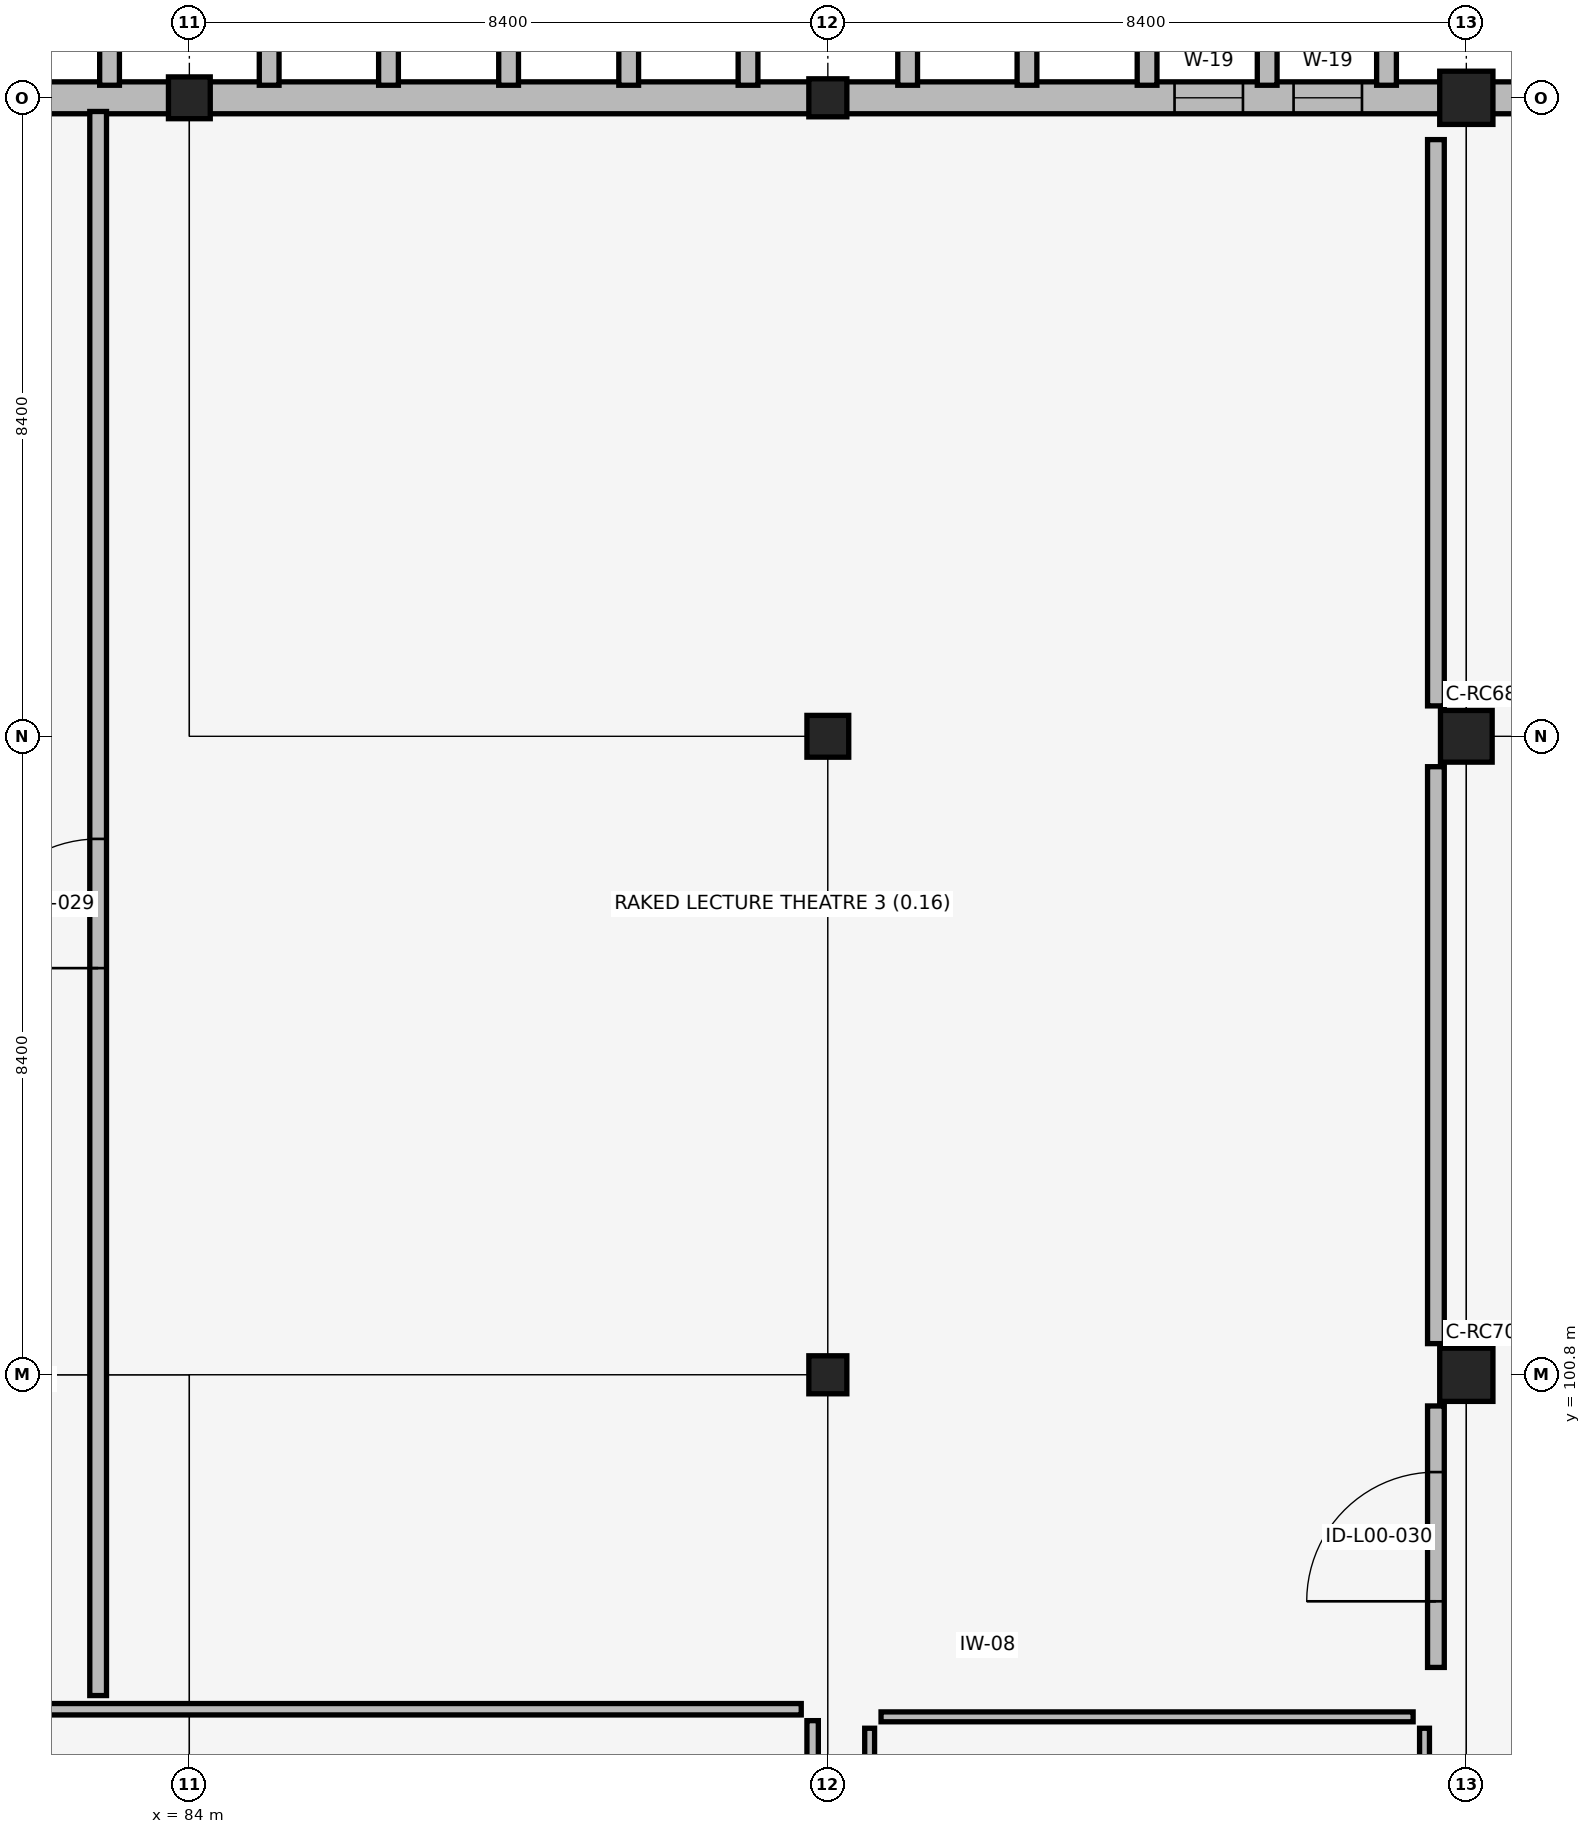
"""IFC4 building model, lengths in metres.
Left out: names, types, materials, properties, quantities, classifications, styles, units other than length and angle.
Written with IfcOpenShell. Run it as: python <this file> out.ifc"""

import sys

from ifc_helpers import new_model, si_unit, direction, frame, frame_2d, origin, origin_2d, place, context, subcontext, project, spatial, rectangle, extrude, element, fill, save


model = new_model("IFC4")
c1 = context("Model", 3, precision=1e-05, world=origin(), true_north=direction((0.0, 1.0)))
c2 = subcontext(c1, "Body", "Model", "MODEL_VIEW")
j1 = project(units=[si_unit("LENGTHUNIT", "METRE"), si_unit("PLANEANGLEUNIT", "RADIAN")], contexts=[c1])
p1 = place(None, origin())
s1 = spatial("IfcSite", under=j1, at=p1, CompositionType="ELEMENT")
p2 = place(p1, origin())
s2 = spatial("IfcBuilding", under=s1, at=p2, CompositionType="ELEMENT")
p3 = place(p2, origin())
s3 = spatial("IfcBuildingStorey", under=s2, at=p3, CompositionType="ELEMENT", Elevation=0.0)
p4 = place(p3, frame((84.0, 117.6, -0.32), z_axis=(0.0, 0.0, 1.0), x_axis=(1.0, 0.0, 0.0)))
e1 = element("IfcColumn", 1, at=p4, inside=s3, PredefinedType="COLUMN", context=c2, shape_type="SweptSolid", body=[
    extrude(rectangle(XDim=0.55, YDim=0.55, at=origin_2d()), origin(), (0.0, 0.0, 1.0), 5.46),
])
p5 = place(p3, frame((92.4, 100.8, -0.32), z_axis=(0.0, 0.0, 1.0), x_axis=(1.0, 0.0, 0.0)))
e2 = element("IfcColumn", 2, at=p5, inside=s3, PredefinedType="COLUMN", context=c2, shape_type="SweptSolid", body=[
    extrude(rectangle(XDim=0.5, YDim=0.5, at=origin_2d()), origin(), (0.0, 0.0, 1.0), 5.46),
])
p6 = place(p3, frame((92.4, 109.2, -0.32), z_axis=(0.0, 0.0, 1.0), x_axis=(1.0, 0.0, 0.0)))
e3 = element("IfcColumn", 3, at=p6, inside=s3, PredefinedType="COLUMN", context=c2, shape_type="SweptSolid", body=[
    extrude(rectangle(XDim=0.55, YDim=0.55, at=origin_2d()), origin(), (0.0, 0.0, 1.0), 5.46),
])
p7 = place(p3, frame((92.4, 117.6, -0.32), z_axis=(0.0, 0.0, 1.0), x_axis=(1.0, 0.0, 0.0)))
e4 = element("IfcColumn", 4, at=p7, inside=s3, PredefinedType="COLUMN", context=c2, shape_type="SweptSolid", body=[
    extrude(rectangle(XDim=0.5, YDim=0.5, at=origin_2d()), origin(), (0.0, 0.0, 1.0), 5.46),
])
p8 = place(p3, frame((100.8, 100.8, 0.0), z_axis=(0.0, 0.0, 1.0), x_axis=(1.0, 0.0, 0.0)))
e5 = element("IfcColumn", 5, at=p8, inside=s3, PredefinedType="COLUMN", context=c2, shape_type="SweptSolid", body=[
    extrude(rectangle(XDim=0.7, YDim=0.7, at=origin_2d()), origin(), (0.0, 0.0, 1.0), 5.14),
])
p9 = place(p3, frame((100.8, 109.2, 0.0), z_axis=(0.0, 0.0, 1.0), x_axis=(1.0, 0.0, 0.0)))
e6 = element("IfcColumn", 6, at=p9, inside=s3, PredefinedType="COLUMN", context=c2, shape_type="SweptSolid", body=[
    extrude(rectangle(XDim=0.68, YDim=0.68, at=origin_2d()), origin(), (0.0, 0.0, 1.0), 5.14),
])
p10 = place(p3, frame((100.8, 117.6, 0.0), z_axis=(0.0, 0.0, 1.0), x_axis=(1.0, 0.0, 0.0)))
e7 = element("IfcColumn", 7, at=p10, inside=s3, PredefinedType="COLUMN", context=c2, shape_type="SweptSolid", body=[
    extrude(rectangle(XDim=0.7, YDim=0.7, at=origin_2d()), origin(), (0.0, 0.0, 1.0), 5.14),
])
p11 = place(p3, frame((75.835, 117.6, 0.0), z_axis=(0.0, 0.0, 1.0), x_axis=(1.0, 0.0, 0.0)))
e8 = element("IfcWall", 8, at=p11, inside=s3, PredefinedType="SOLIDWALL", context=c2, shape_type="SweptSolid", body=[
    extrude(rectangle(XDim=7.905, YDim=0.42, at=frame_2d((3.953, 0.0))), origin(), (0.0, 0.0, 1.0), 4.4),
])
p12 = place(p11, frame((2.853, 0.0, 0.0)))
e9 = element("IfcOpeningElement", 9, at=p12, cuts=e8, PredefinedType="OPENING", context=c2, shape_type="SweptSolid", body=[
    extrude(rectangle(XDim=2.2, YDim=2.4, at=frame_2d((1.1, 1.2))), frame((0.0, 0.22, 0.0), z_axis=(0.0, -1.0, 0.0), x_axis=(1.0, 0.0, 0.0)), (0.0, 0.0, 1.0), 0.44),
])
p13 = place(p3, frame((82.95, 117.765, -0.32), z_axis=(0.0, 0.0, 1.0), x_axis=(0.0, 1.0, 0.0)))
e10 = element("IfcWall", 10, at=p13, inside=s3, PredefinedType="SOLIDWALL", context=c2, shape_type="SweptSolid", body=[
    extrude(rectangle(XDim=0.7, YDim=0.26, at=frame_2d((0.35, 0.0))), origin(), (0.0, 0.0, 1.0), 5.76),
])
p14 = place(p3, frame((84.26, 117.6, 0.0), z_axis=(0.0, 0.0, 1.0), x_axis=(1.0, 0.0, 0.0)))
e11 = element("IfcWall", 11, at=p14, inside=s3, PredefinedType="SOLIDWALL", context=c2, shape_type="SweptSolid", body=[
    extrude(rectangle(XDim=7.905, YDim=0.42, at=frame_2d((3.953, 0.0))), origin(), (0.0, 0.0, 1.0), 4.4),
])
for number, where, z_axis, x_axis in (
    (12, (85.05, 117.765, -0.32), (0.0, 0.0, 1.0), (0.0, 1.0, 0.0)),
    (13, (86.62, 117.765, -0.32), (0.0, 0.0, 1.0), (0.0, 1.0, 0.0)),
    (14, (88.2, 117.765, -0.32), (0.0, 0.0, 1.0), (0.0, 1.0, 0.0)),
    (15, (89.78, 117.765, -0.32), (0.0, 0.0, 1.0), (0.0, 1.0, 0.0)),
    (16, (91.35, 117.765, -0.32), (0.0, 0.0, 1.0), (0.0, 1.0, 0.0)),
):
    element("IfcWall", number, at=place(p3, frame(where, z_axis=z_axis, x_axis=x_axis)), inside=s3, PredefinedType="SOLIDWALL", context=c2, shape_type="SweptSolid", body=[
        extrude(rectangle(XDim=0.7, YDim=0.26, at=frame_2d((0.35, 0.0))), origin(), (0.0, 0.0, 1.0), 5.76),
    ])
p15 = place(p3, frame((92.635, 117.6, 0.0), z_axis=(0.0, 0.0, 1.0), x_axis=(1.0, 0.0, 0.0)))
e17 = element("IfcWall", 17, at=p15, inside=s3, PredefinedType="SOLIDWALL", context=c2, shape_type="SweptSolid", body=[
    extrude(rectangle(XDim=7.83, YDim=0.42, at=frame_2d((3.915, 0.0))), origin(), (0.0, 0.0, 1.0), 4.4),
])
p16 = place(p15, frame((4.326, 0.0, 0.75)))
e18 = element("IfcOpeningElement", 18, at=p16, cuts=e17, PredefinedType="OPENING", context=c2, shape_type="SweptSolid", body=[
    extrude(rectangle(XDim=0.9, YDim=3.0, at=frame_2d((0.45, 1.5))), frame((0.0, 0.22, 0.0), z_axis=(0.0, -1.0, 0.0), x_axis=(1.0, 0.0, 0.0)), (0.0, 0.0, 1.0), 0.44),
])
p17 = place(p15, frame((5.892, 0.0, 0.75)))
e19 = element("IfcOpeningElement", 19, at=p17, cuts=e17, PredefinedType="OPENING", context=c2, shape_type="SweptSolid", body=[
    extrude(rectangle(XDim=0.9, YDim=3.0, at=frame_2d((0.45, 1.5))), frame((0.0, 0.22, 0.0), z_axis=(0.0, -1.0, 0.0), x_axis=(1.0, 0.0, 0.0)), (0.0, 0.0, 1.0), 0.44),
])
for number, where, z_axis, x_axis in (
    (20, (93.45, 117.765, -0.32), (0.0, 0.0, 1.0), (0.0, 1.0, 0.0)),
    (21, (95.02, 117.765, -0.32), (0.0, 0.0, 1.0), (0.0, 1.0, 0.0)),
    (22, (96.6, 117.765, -0.32), (0.0, 0.0, 1.0), (0.0, 1.0, 0.0)),
    (23, (98.18, 117.765, -0.32), (0.0, 0.0, 1.0), (0.0, 1.0, 0.0)),
):
    element("IfcWall", number, at=place(p3, frame(where, z_axis=z_axis, x_axis=x_axis)), inside=s3, PredefinedType="SOLIDWALL", context=c2, shape_type="SweptSolid", body=[
        extrude(rectangle(XDim=0.7, YDim=0.26, at=frame_2d((0.35, 0.0))), origin(), (0.0, 0.0, 1.0), 5.76),
    ])
p18 = place(p3, frame((99.75, 117.765, -0.25), z_axis=(0.0, 0.0, 1.0), x_axis=(0.0, 1.0, 0.0)))
e24 = element("IfcWall", 24, at=p18, inside=s3, PredefinedType="SOLIDWALL", context=c2, shape_type="SweptSolid", body=[
    extrude(rectangle(XDim=0.7, YDim=0.26, at=frame_2d((0.35, 0.0))), origin(), (0.0, 0.0, 1.0), 5.69),
])
p19 = place(p3, frame((101.135, 117.6, 0.0), z_axis=(0.0, 0.0, 1.0), x_axis=(1.0, 0.0, 0.0)))
e25 = element("IfcWall", 25, at=p19, inside=s3, PredefinedType="SOLIDWALL", context=c2, shape_type="SweptSolid", body=[
    extrude(rectangle(XDim=7.74, YDim=0.42, at=frame_2d((3.87, 0.0))), origin(), (0.0, 0.0, 1.0), 4.4),
])
p20 = place(p3, frame((71.38, 96.4, 0.0), z_axis=(0.0, 0.0, 1.0), x_axis=(1.0, 0.0, 0.0)))
e26 = element("IfcWall", 26, at=p20, inside=s3, PredefinedType="PARTITIONING", context=c2, shape_type="SweptSolid", body=[
    extrude(rectangle(XDim=20.67, YDim=0.15, at=frame_2d((10.335, 0.0))), origin(), (0.0, 0.0, 1.0), 4.74),
])
p21 = place(p3, frame((92.2, 92.735, 0.0), z_axis=(0.0, 0.0, 1.0), x_axis=(0.0, 1.0, 0.0)))
e27 = element("IfcWall", 27, at=p21, inside=s3, PredefinedType="PARTITIONING", context=c2, shape_type="SweptSolid", body=[
    extrude(rectangle(XDim=3.515, YDim=0.15, at=frame_2d((1.757, 0.0))), origin(), (0.0, 0.0, 1.0), 5.14),
])
p22 = place(p3, frame((93.1, 96.3, 0.0), z_axis=(0.0, 0.0, 1.0), x_axis=(1.0, 0.0, 0.0)))
e28 = element("IfcWall", 28, at=p22, inside=s3, PredefinedType="PARTITIONING", context=c2, shape_type="SweptSolid", body=[
    extrude(rectangle(XDim=7.0, YDim=0.13, at=frame_2d((3.5, 0.0))), origin(), (0.0, 0.0, 1.0), 5.14),
])
for number, where, z_axis, x_axis in (
    (29, (92.95, 87.5, 0.0), (0.0, 0.0, 1.0), (0.0, 1.0, 0.0)),
    (30, (100.25, 87.5, 0.0), (0.0, 0.0, 1.0), (0.0, 1.0, 0.0)),
):
    element("IfcWall", number, at=place(p3, frame(where, z_axis=z_axis, x_axis=x_axis)), inside=s3, PredefinedType="PARTITIONING", context=c2, shape_type="SweptSolid", body=[
        extrude(rectangle(XDim=8.65, YDim=0.13, at=frame_2d((4.325, 0.0))), origin(), (0.0, 0.0, 1.0), 4.46),
    ])
p23 = place(p3, frame((82.8, 96.58, 0.0), z_axis=(0.0, 0.0, 1.0), x_axis=(0.0, 1.0, 0.0)))
e31 = element("IfcWall", 31, at=p23, inside=s3, PredefinedType="PARTITIONING", context=c2, shape_type="SweptSolid", body=[
    extrude(rectangle(XDim=20.84, YDim=0.22, at=frame_2d((10.42, 0.0))), origin(), (0.0, 0.0, 1.0), 3.74),
])
p24 = place(p23, frame((9.57, 0.0, 0.0)))
e32 = element("IfcOpeningElement", 32, at=p24, cuts=e31, PredefinedType="OPENING", context=c2, shape_type="SweptSolid", body=[
    extrude(rectangle(XDim=1.7, YDim=2.25, at=frame_2d((0.85, 1.125))), frame((0.0, 0.12, 0.0), z_axis=(0.0, -1.0, 0.0), x_axis=(1.0, 0.0, 0.0)), (0.0, 0.0, 1.0), 0.24),
])
p25 = place(p3, frame((100.4, 96.95, 0.0), z_axis=(0.0, 0.0, 1.0), x_axis=(0.0, 1.0, 0.0)))
e33 = element("IfcWall", 33, at=p25, inside=s3, PredefinedType="PARTITIONING", context=c2, shape_type="SweptSolid", body=[
    extrude(rectangle(XDim=3.44, YDim=0.22, at=frame_2d((1.72, 0.0))), origin(), (0.0, 0.0, 1.0), 5.14),
])
p26 = place(p25, frame((0.87, 0.0, 0.0)))
e34 = element("IfcOpeningElement", 34, at=p26, cuts=e33, PredefinedType="OPENING", context=c2, shape_type="SweptSolid", body=[
    extrude(rectangle(XDim=1.7, YDim=2.25, at=frame_2d((0.85, 1.125))), frame((0.0, 0.12, 0.0), z_axis=(0.0, -1.0, 0.0), x_axis=(1.0, 0.0, 0.0)), (0.0, 0.0, 1.0), 0.24),
])
p27 = place(p3, frame((100.4, 101.21, 0.0), z_axis=(0.0, 0.0, 1.0), x_axis=(0.0, 1.0, 0.0)))
e35 = element("IfcWall", 35, at=p27, inside=s3, PredefinedType="PARTITIONING", context=c2, shape_type="SweptSolid", body=[
    extrude(rectangle(XDim=7.59, YDim=0.22, at=frame_2d((3.795, 0.0))), origin(), (0.0, 0.0, 1.0), 5.14),
])
p28 = place(p3, frame((100.4, 109.6, 0.0), z_axis=(0.0, 0.0, 1.0), x_axis=(0.0, 1.0, 0.0)))
e36 = element("IfcWall", 36, at=p28, inside=s3, PredefinedType="PARTITIONING", context=c2, shape_type="SweptSolid", body=[
    extrude(rectangle(XDim=7.45, YDim=0.22, at=frame_2d((3.725, 0.0))), origin(), (0.0, 0.0, 1.0), 4.59),
])
p29 = place(p16, origin())
e37 = element("IfcWindow", 37, at=p29, inside=s3, PartitioningType="DOUBLE_PANEL_VERTICAL", PredefinedType="WINDOW", context=c2, shape_type="SweptSolid", body=[
    extrude(rectangle(XDim=0.9, YDim=3.0, at=frame_2d((0.45, 1.5))), frame((0.0, 0.03, 0.0), z_axis=(0.0, -1.0, 0.0), x_axis=(1.0, 0.0, 0.0)), (0.0, 0.0, 1.0), 0.06),
])
fill(e18, e37)
p30 = place(p17, origin())
e38 = element("IfcWindow", 38, at=p30, inside=s3, PartitioningType="DOUBLE_PANEL_VERTICAL", PredefinedType="WINDOW", context=c2, shape_type="SweptSolid", body=[
    extrude(rectangle(XDim=0.9, YDim=3.0, at=frame_2d((0.45, 1.5))), frame((0.0, 0.03, 0.0), z_axis=(0.0, -1.0, 0.0), x_axis=(1.0, 0.0, 0.0)), (0.0, 0.0, 1.0), 0.06),
])
fill(e19, e38)
p31 = place(p24, origin())
e39 = element("IfcDoor", 39, at=p31, inside=s3, OperationType="DOUBLE_DOOR_SINGLE_SWING", PredefinedType="DOOR", context=c2, shape_type="SweptSolid", body=[
    extrude(rectangle(XDim=1.7, YDim=2.25, at=frame_2d((0.85, 1.125))), frame((0.0, 0.025, 0.0), z_axis=(0.0, -1.0, 0.0), x_axis=(1.0, 0.0, 0.0)), (0.0, 0.0, 1.0), 0.05),
])
fill(e32, e39)
p32 = place(p26, origin())
e40 = element("IfcDoor", 40, at=p32, inside=s3, OperationType="DOUBLE_DOOR_SINGLE_SWING", PredefinedType="DOOR", context=c2, shape_type="SweptSolid", body=[
    extrude(rectangle(XDim=1.7, YDim=2.25, at=frame_2d((0.85, 1.125))), frame((0.0, 0.025, 0.0), z_axis=(0.0, -1.0, 0.0), x_axis=(1.0, 0.0, 0.0)), (0.0, 0.0, 1.0), 0.05),
])
fill(e34, e40)
save(model, sys.argv[1])
